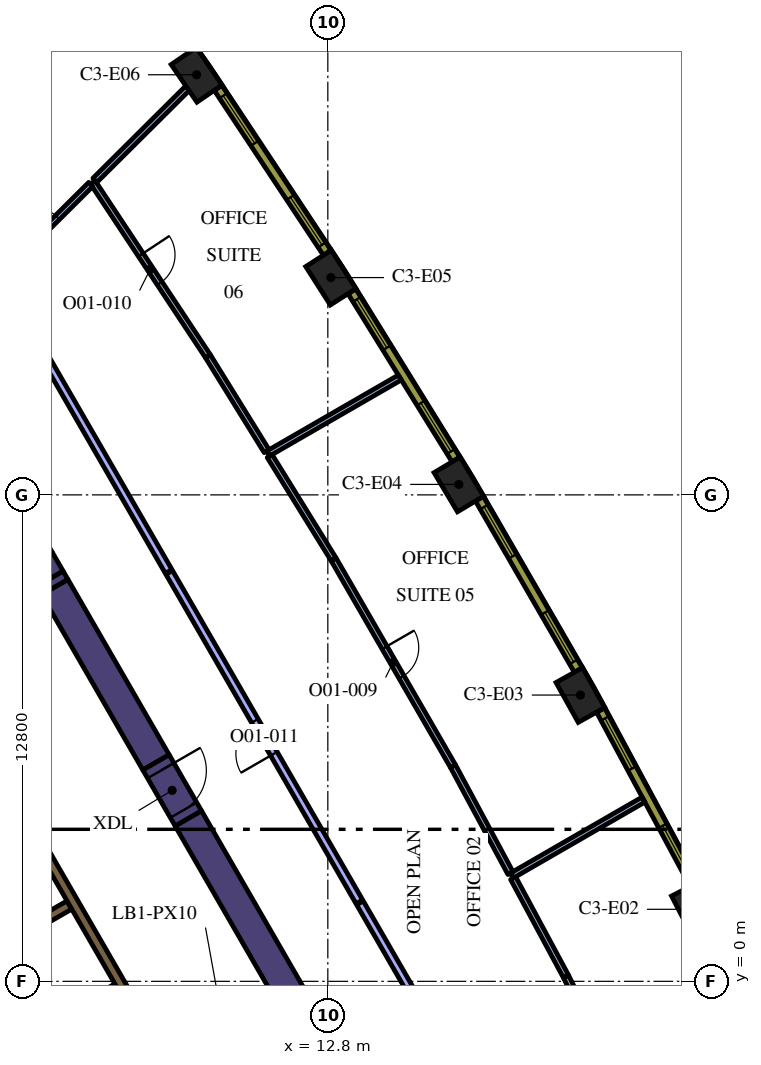
"""IFC4 building model, lengths in metres.
Left out: names, types, materials, properties, quantities, classifications, styles, units other than length and angle.
Written with IfcOpenShell. Run it as: python <this file> out.ifc"""

import sys

from ifc_helpers import new_model, si_unit, direction, frame, frame_2d, origin, origin_2d, place, context, subcontext, project, spatial, polyline, rectangle, outline, extrude, element, fill, save


model = new_model("IFC4")
c1 = context("Model", 3, precision=1e-05, world=origin(), true_north=direction((0.0, 1.0)))
c2 = subcontext(c1, "Body", "Model", "MODEL_VIEW")
j1 = project(units=[si_unit("LENGTHUNIT", "METRE"), si_unit("PLANEANGLEUNIT", "RADIAN")], contexts=[c1])
p1 = place(None, origin())
s1 = spatial("IfcSite", under=j1, at=p1, CompositionType="ELEMENT")
p2 = place(p1, origin())
s2 = spatial("IfcBuilding", under=s1, at=p2, CompositionType="ELEMENT")
p3 = place(p2, frame((0.0, 0.0, 141.6)))
s3 = spatial("IfcBuildingStorey", under=s2, at=p3, CompositionType="ELEMENT", Elevation=141.6)
for number, where, z_axis, x_axis in (
    (1, (22.476, 1.896, 0.0), (0.0, 0.0, 1.0), (-0.46, 0.888, 0.0)),
    (2, (19.447, 7.533, 0.0), (0.0, 0.0, 1.0), (-0.487, 0.874, 0.0)),
    (3, (16.247, 13.075, 0.0), (0.0, 0.0, 1.0), (-0.513, 0.858, 0.0)),
    (4, (12.88, 18.517, 0.0), (0.0, 0.0, 1.0), (-0.539, 0.842, 0.0)),
    (5, (9.348, 23.854, 0.0), (0.0, 0.0, 1.0), (-0.565, 0.825, 0.0)),
):
    element("IfcColumn", number, at=place(p3, frame(where, z_axis=z_axis, x_axis=x_axis)), inside=s3, PredefinedType="COLUMN", context=c2, shape_type="SweptSolid", body=[
        extrude(rectangle(XDim=1.2, YDim=0.8, at=origin_2d()), origin(), (0.0, 0.0, 1.0), 4.2),
    ])
p4 = place(p3, frame((9.129, 4.289, 0.0), z_axis=(0.0, 0.0, 1.0), x_axis=(0.499995742806, -0.866027861663, 0.0)))
e6 = element("IfcWall", 6, at=p4, inside=s3, PredefinedType="SOLIDWALL", context=c2, shape_type="SweptSolid", body=[
    extrude(rectangle(XDim=12.527, YDim=0.8, at=frame_2d((6.264, 0.0))), origin(), (0.0, 0.0, 1.0), 4.2),
])
p5 = place(p3, frame((5.489, 10.594, 0.0), z_axis=(0.0, 0.0, 1.0), x_axis=(-0.500000383388, 0.866025182435, 0.0)))
e7 = element("IfcWall", 7, at=p5, inside=s3, PredefinedType="SOLIDWALL", context=c2, shape_type="SweptSolid", body=[
    extrude(rectangle(XDim=0.558, YDim=0.8, at=frame_2d((0.279, 0.0))), origin(), (0.0, 0.0, 1.0), 4.2),
])
p6 = place(p3, frame((5.615, 10.375, 0.0), z_axis=(0.0, 0.0, 1.0), x_axis=(0.500002746266, -0.866023818221, 0.0)))
e8 = element("IfcWall", 8, at=p6, inside=s3, PredefinedType="SOLIDWALL", context=c2, shape_type="SweptSolid", body=[
    extrude(rectangle(XDim=5.328, YDim=0.8, at=frame_2d((2.664, 0.0))), origin(), (0.0, 0.0, 1.0), 4.2),
])
p7 = place(p3, origin())
e9 = element("IfcWall", 9, at=p7, inside=s3, PredefinedType="SOLIDWALL", context=c2, shape_type="SweptSolid", body=[
    extrude(outline(polyline([(5.432, 10.272), (5.308, 10.487), (5.836, 10.792), (5.96, 10.577), (5.432, 10.272)])), origin(), (0.0, 0.0, 1.0), 4.2),
])
p8 = place(p3, frame((5.209, 11.078, 0.0), z_axis=(0.0, 0.0, 1.0), x_axis=(-0.500035624827, 0.866004834804, 0.0)))
e10 = element("IfcWall", 10, at=p8, inside=s3, PredefinedType="SOLIDWALL", context=c2, shape_type="SweptSolid", body=[
    extrude(rectangle(XDim=6.388, YDim=0.8, at=frame_2d((3.194, 0.0))), origin(), (0.0, 0.0, 1.0), 4.2),
])
p9 = place(p3, frame((5.97, -2.591, 0.0), z_axis=(0.0, 0.0, 1.0), x_axis=(-0.499994469932, 0.866028596547, 0.0)))
e11 = element("IfcWall", 11, at=p9, inside=s3, PredefinedType="SOLIDWALL", context=c2, shape_type="SweptSolid", body=[
    extrude(rectangle(XDim=10.488, YDim=0.25, at=frame_2d((5.244, 0.0))), origin(), (0.0, 0.0, 1.0), 4.2),
])
for number, where, z_axis, x_axis in (
    (12, (4.094, 0.909, 0.0), (0.0, 0.0, 1.0), (0.866, 0.5, 0.0)),
    (13, (5.354, -1.274, 0.0), (0.0, 0.0, 1.0), (0.866, 0.5, 0.0)),
):
    element("IfcWall", number, at=place(p3, frame(where, z_axis=z_axis, x_axis=x_axis)), inside=s3, PredefinedType="SOLIDWALL", context=c2, shape_type="SweptSolid", body=[
        extrude(rectangle(XDim=2.2, YDim=0.25, at=frame_2d((1.1, 0.0))), origin(), (0.0, 0.0, 1.0), 4.2),
    ])
p10 = place(p3, frame((8.565, -2.185, 0.0), z_axis=(0.0, 0.0, 1.0), x_axis=(-0.499997954832, 0.866026584559, 0.0)))
e14 = element("IfcWall", 14, at=p10, inside=s3, PredefinedType="SOLIDWALL", context=c2, shape_type="SweptSolid", body=[
    extrude(rectangle(XDim=12.35, YDim=0.25, at=frame_2d((6.175, 0.0))), origin(), (0.0, 0.0, 1.0), 4.2),
])
p11 = place(p10, frame((0.585, 0.0, 0.0)))
e15 = element("IfcOpeningElement", 15, at=p11, cuts=e14, PredefinedType="OPENING", context=c2, shape_type="SweptSolid", body=[
    extrude(rectangle(XDim=1.1, YDim=2.1, at=frame_2d((0.55, 1.05))), frame((0.0, 0.135, 0.0), z_axis=(0.0, -1.0, 0.0), x_axis=(1.0, 0.0, 0.0)), (0.0, 0.0, 1.0), 0.27),
])
p12 = place(p3, frame((8.279, 5.761, 0.0), z_axis=(0.0, 0.0, 1.0), x_axis=(0.500062241894, -0.865989465428, 0.0)))
e16 = element("IfcWall", 16, at=p12, inside=s3, PredefinedType="SOLIDWALL", context=c2, shape_type="SweptSolid", body=[
    extrude(rectangle(XDim=1.7, YDim=0.8, at=frame_2d((0.85, 0.0))), origin(), (0.0, 0.0, 1.0), 4.2),
])
p13 = place(p12, frame((0.25, 0.0, 0.0)))
e17 = element("IfcOpeningElement", 17, at=p13, cuts=e16, PredefinedType="OPENING", context=c2, shape_type="SweptSolid", body=[
    extrude(rectangle(XDim=1.2, YDim=2.1, at=frame_2d((0.6, 1.05))), frame((0.0, 0.41, 0.0), z_axis=(0.0, -1.0, 0.0), x_axis=(1.0, 0.0, 0.0)), (0.0, 0.0, 1.0), 0.82),
])
p14 = place(p3, frame((17.641, 2.781, 0.0), z_axis=(0.0, 0.0, 1.0), x_axis=(0.866053520969, 0.499951296445, 0.0)))
e18 = element("IfcWall", 18, at=p14, inside=s3, PredefinedType="PARTITIONING", context=c2, shape_type="SweptSolid", body=[
    extrude(rectangle(XDim=4.002, YDim=0.15, at=frame_2d((2.001, 0.0))), origin(), (0.0, 0.0, 1.0), 3.15),
])
p15 = place(p3, frame((19.066, 0.129, 0.0), z_axis=(0.0, 0.0, 1.0), x_axis=(0.446202922071, -0.89493181435, 0.0)))
e19 = element("IfcWall", 19, at=p15, inside=s3, PredefinedType="PARTITIONING", context=c2, shape_type="SweptSolid", body=[
    extrude(rectangle(XDim=6.282, YDim=0.15, at=frame_2d((3.141, 0.0))), origin(), (0.0, 0.0, 1.0), 3.15),
])
p16 = place(p15, frame((2.683, 0.0, 0.0)))
e20 = element("IfcOpeningElement", 20, at=p16, cuts=e19, PredefinedType="OPENING", context=c2, shape_type="SweptSolid", body=[
    extrude(rectangle(XDim=0.9, YDim=2.1, at=frame_2d((0.45, 1.05))), frame((0.0, 0.085, 0.0), z_axis=(0.0, -1.0, 0.0), x_axis=(1.0, 0.0, 0.0)), (0.0, 0.0, 1.0), 0.17),
])
p17 = place(p3, frame((19.066, 0.129, 0.0), z_axis=(0.0, 0.0, 1.0), x_axis=(-0.473335829303, 0.880882053795, 0.0)))
e21 = element("IfcWall", 21, at=p17, inside=s3, PredefinedType="PARTITIONING", context=c2, shape_type="SweptSolid", body=[
    extrude(rectangle(XDim=2.935, YDim=0.15, at=frame_2d((1.468, 0.0))), origin(), (0.0, 0.0, 1.0), 3.15),
])
p18 = place(p3, frame((11.229, 13.887, 0.0), z_axis=(0.0, 0.0, 1.0), x_axis=(0.866038271014, 0.499977712642, 0.0)))
e22 = element("IfcWall", 22, at=p18, inside=s3, PredefinedType="PARTITIONING", context=c2, shape_type="SweptSolid", body=[
    extrude(rectangle(XDim=4.002, YDim=0.15, at=frame_2d((2.001, 0.0))), origin(), (0.0, 0.0, 1.0), 3.15),
])
p19 = place(p3, frame((17.606, 2.847, 0.0), z_axis=(0.0, 0.0, 1.0), x_axis=(-0.473348321673, 0.880875340993, 0.0)))
e23 = element("IfcWall", 23, at=p19, inside=s3, PredefinedType="PARTITIONING", context=c2, shape_type="SweptSolid", body=[
    extrude(rectangle(XDim=3.197, YDim=0.15, at=frame_2d((1.599, 0.0))), origin(), (0.0, 0.0, 1.0), 3.15),
])
p20 = place(p3, frame((12.951, 11.104, 0.0), z_axis=(0.0, 0.0, 1.0), x_axis=(0.499992691614, -0.866029623242, 0.0)))
e24 = element("IfcWall", 24, at=p20, inside=s3, PredefinedType="PARTITIONING", context=c2, shape_type="SweptSolid", body=[
    extrude(rectangle(XDim=6.282, YDim=0.15, at=frame_2d((3.141, 0.0))), origin(), (0.0, 0.0, 1.0), 3.15),
])
p21 = place(p20, frame((2.683, 0.0, 0.0)))
e25 = element("IfcOpeningElement", 25, at=p21, cuts=e24, PredefinedType="OPENING", context=c2, shape_type="SweptSolid", body=[
    extrude(rectangle(XDim=0.9, YDim=2.1, at=frame_2d((0.45, 1.05))), frame((0.0, 0.085, 0.0), z_axis=(0.0, -1.0, 0.0), x_axis=(1.0, 0.0, 0.0)), (0.0, 0.0, 1.0), 0.17),
])
p22 = place(p3, frame((12.951, 11.104, 0.0), z_axis=(0.0, 0.0, 1.0), x_axis=(-0.526204763311, 0.850357893518, 0.0)))
e26 = element("IfcWall", 26, at=p22, inside=s3, PredefinedType="PARTITIONING", context=c2, shape_type="SweptSolid", body=[
    extrude(rectangle(XDim=3.197, YDim=0.15, at=frame_2d((1.599, 0.0))), origin(), (0.0, 0.0, 1.0), 3.15),
])
p23 = place(p3, frame((11.19, 13.951, 0.0), z_axis=(0.0, 0.0, 1.0), x_axis=(-0.526165616903, 0.850382116221, 0.0)))
e27 = element("IfcWall", 27, at=p23, inside=s3, PredefinedType="PARTITIONING", context=c2, shape_type="SweptSolid", body=[
    extrude(rectangle(XDim=2.935, YDim=0.15, at=frame_2d((1.468, 0.0))), origin(), (0.0, 0.0, 1.0), 3.15),
])
p24 = place(p3, frame((6.616, 21.024, 0.0), z_axis=(0.0, 0.0, 1.0), x_axis=(0.551915124006, -0.833900291338, 0.0)))
e28 = element("IfcWall", 28, at=p24, inside=s3, PredefinedType="PARTITIONING", context=c2, shape_type="SweptSolid", body=[
    extrude(rectangle(XDim=5.488, YDim=0.15, at=frame_2d((2.744, 0.0))), origin(), (0.0, 0.0, 1.0), 3.15),
])
p25 = place(p24, frame((2.288, 0.0, 0.0)))
e29 = element("IfcOpeningElement", 29, at=p25, cuts=e28, PredefinedType="OPENING", context=c2, shape_type="SweptSolid", body=[
    extrude(rectangle(XDim=0.9, YDim=2.1, at=frame_2d((0.45, 1.05))), frame((0.0, 0.085, 0.0), z_axis=(0.0, -1.0, 0.0), x_axis=(1.0, 0.0, 0.0)), (0.0, 0.0, 1.0), 0.17),
])
p26 = place(p3, frame((6.67, 21.078, 0.0), z_axis=(0.0, 0.0, 1.0), x_axis=(0.709236178776, 0.704970951681, 0.0)))
e30 = element("IfcWall", 30, at=p26, inside=s3, PredefinedType="PARTITIONING", context=c2, shape_type="SweptSolid", body=[
    extrude(rectangle(XDim=3.434, YDim=0.15, at=frame_2d((1.717, 0.0))), origin(), (0.0, 0.0, 1.0), 3.15),
])
p27 = place(p3, frame((4.128, 18.55, 0.0), z_axis=(0.0, 0.0, 1.0), x_axis=(0.709237676072, 0.704969445324, 0.0)))
e31 = element("IfcWall", 31, at=p27, inside=s3, PredefinedType="PARTITIONING", context=c2, shape_type="SweptSolid", body=[
    extrude(rectangle(XDim=3.432, YDim=0.15, at=frame_2d((1.716, 0.0))), origin(), (0.0, 0.0, 1.0), 3.15),
])
p28 = place(p27, frame((1.3, 0.0, 0.0)))
e32 = element("IfcOpeningElement", 32, at=p28, cuts=e31, PredefinedType="OPENING", context=c2, shape_type="SweptSolid", body=[
    extrude(rectangle(XDim=0.9, YDim=2.1, at=frame_2d((0.45, 1.05))), frame((0.0, 0.085, 0.0), z_axis=(0.0, -1.0, 0.0), x_axis=(1.0, 0.0, 0.0)), (0.0, 0.0, 1.0), 0.17),
])
p29 = place(p3, frame((13.63, 2.091, 0.0), z_axis=(0.0, 0.0, 1.0), x_axis=(-0.499990634175, 0.866030811078, 0.0)))
e33 = element("IfcWall", 33, at=p29, inside=s3, PredefinedType="PARTITIONING", context=c2, shape_type="SweptSolid", body=[
    extrude(rectangle(XDim=10.008, YDim=0.2, at=frame_2d((5.004, 0.0))), origin(), (0.0, 0.0, 1.0), 3.15),
])
p30 = place(p29, frame((4.5, 0.0, 0.0)))
e34 = element("IfcOpeningElement", 34, at=p30, cuts=e33, PredefinedType="OPENING", context=c2, shape_type="SweptSolid", body=[
    extrude(rectangle(XDim=1.0, YDim=2.1, at=frame_2d((0.5, 1.05))), frame((0.0, 0.11, 0.0), z_axis=(0.0, -1.0, 0.0), x_axis=(1.0, 0.0, 0.0)), (0.0, 0.0, 1.0), 0.22),
])
p31 = place(p3, frame((8.611, 10.785, 0.0), z_axis=(0.0, 0.0, 1.0), x_axis=(-0.499987928593, 0.866032373102, 0.0)))
e35 = element("IfcWall", 35, at=p31, inside=s3, PredefinedType="PARTITIONING", context=c2, shape_type="SweptSolid", body=[
    extrude(rectangle(XDim=8.889, YDim=0.2, at=frame_2d((4.445, 0.0))), origin(), (0.0, 0.0, 1.0), 3.15),
])
p32 = place(p3, frame((18.504, -6.35, 0.0), z_axis=(0.0, 0.0, 1.0), x_axis=(-0.499995029582, 0.866028273438, 0.0)))
e36 = element("IfcWall", 36, at=p32, inside=s3, PredefinedType="PARTITIONING", context=c2, shape_type="SweptSolid", body=[
    extrude(rectangle(XDim=9.717, YDim=0.2, at=frame_2d((4.859, 0.0))), origin(), (0.0, 0.0, 1.0), 3.15),
])
p33 = place(p3, frame((22.44, 2.555, 0.0), z_axis=(0.0, 0.0, 1.0), x_axis=(-0.473349833294, 0.880874528704, 0.0)))
e37 = element("IfcWall", 37, at=p33, inside=s3, PredefinedType="SOLIDWALL", context=c2, shape_type="SweptSolid", body=[
    extrude(rectangle(XDim=5.204, YDim=0.24, at=frame_2d((2.602, 0.0))), origin(), (0.0, 0.0, 1.0), 3.95),
])
p34 = place(p33, frame((0.248, 0.0, 0.9)))
e38 = element("IfcOpeningElement", 38, at=p34, cuts=e37, PredefinedType="OPENING", context=c2, shape_type="SweptSolid", body=[
    extrude(rectangle(XDim=1.5, YDim=2.55, at=frame_2d((0.75, 1.275))), frame((0.0, 0.13, 0.0), z_axis=(0.0, -1.0, 0.0), x_axis=(1.0, 0.0, 0.0)), (0.0, 0.0, 1.0), 0.26),
])
p35 = place(p33, frame((3.455, 0.0, 0.9)))
e39 = element("IfcOpeningElement", 39, at=p35, cuts=e37, PredefinedType="OPENING", context=c2, shape_type="SweptSolid", body=[
    extrude(rectangle(XDim=1.5, YDim=2.55, at=frame_2d((0.75, 1.275))), frame((0.0, 0.13, 0.0), z_axis=(0.0, -1.0, 0.0), x_axis=(1.0, 0.0, 0.0)), (0.0, 0.0, 1.0), 0.26),
])
p36 = place(p3, frame((19.391, 8.191, 0.0), z_axis=(0.0, 0.0, 1.0), x_axis=(-0.500009456303, 0.866019944116, 0.0)))
e40 = element("IfcWall", 40, at=p36, inside=s3, PredefinedType="SOLIDWALL", context=c2, shape_type="SweptSolid", body=[
    extrude(rectangle(XDim=5.204, YDim=0.24, at=frame_2d((2.602, 0.0))), origin(), (0.0, 0.0, 1.0), 3.95),
])
p37 = place(p36, frame((0.248, 0.0, 0.9)))
e41 = element("IfcOpeningElement", 41, at=p37, cuts=e40, PredefinedType="OPENING", context=c2, shape_type="SweptSolid", body=[
    extrude(rectangle(XDim=1.5, YDim=2.55, at=frame_2d((0.75, 1.275))), frame((0.0, 0.13, 0.0), z_axis=(0.0, -1.0, 0.0), x_axis=(1.0, 0.0, 0.0)), (0.0, 0.0, 1.0), 0.26),
])
p38 = place(p36, frame((3.455, 0.0, 0.9)))
e42 = element("IfcOpeningElement", 42, at=p38, cuts=e40, PredefinedType="OPENING", context=c2, shape_type="SweptSolid", body=[
    extrude(rectangle(XDim=1.5, YDim=2.55, at=frame_2d((0.75, 1.275))), frame((0.0, 0.13, 0.0), z_axis=(0.0, -1.0, 0.0), x_axis=(1.0, 0.0, 0.0)), (0.0, 0.0, 1.0), 0.26),
])
p39 = place(p3, frame((16.171, 13.731, 0.0), z_axis=(0.0, 0.0, 1.0), x_axis=(-0.526197926587, 0.850362124072, 0.0)))
e43 = element("IfcWall", 43, at=p39, inside=s3, PredefinedType="SOLIDWALL", context=c2, shape_type="SweptSolid", body=[
    extrude(rectangle(XDim=5.203, YDim=0.24, at=frame_2d((2.602, 0.0))), origin(), (0.0, 0.0, 1.0), 3.95),
])
p40 = place(p39, frame((0.248, 0.0, 0.9)))
e44 = element("IfcOpeningElement", 44, at=p40, cuts=e43, PredefinedType="OPENING", context=c2, shape_type="SweptSolid", body=[
    extrude(rectangle(XDim=1.5, YDim=2.55, at=frame_2d((0.75, 1.275))), frame((0.0, 0.13, 0.0), z_axis=(0.0, -1.0, 0.0), x_axis=(1.0, 0.0, 0.0)), (0.0, 0.0, 1.0), 0.26),
])
p41 = place(p39, frame((3.455, 0.0, 0.9)))
e45 = element("IfcOpeningElement", 45, at=p41, cuts=e43, PredefinedType="OPENING", context=c2, shape_type="SweptSolid", body=[
    extrude(rectangle(XDim=1.5, YDim=2.55, at=frame_2d((0.75, 1.275))), frame((0.0, 0.13, 0.0), z_axis=(0.0, -1.0, 0.0), x_axis=(1.0, 0.0, 0.0)), (0.0, 0.0, 1.0), 0.26),
])
p42 = place(p3, frame((12.783, 19.171, 0.0), z_axis=(0.0, 0.0, 1.0), x_axis=(-0.551892811511, 0.833915058386, 0.0)))
e46 = element("IfcWall", 46, at=p42, inside=s3, PredefinedType="SOLIDWALL", context=c2, shape_type="SweptSolid", body=[
    extrude(rectangle(XDim=5.204, YDim=0.24, at=frame_2d((2.602, 0.0))), origin(), (0.0, 0.0, 1.0), 3.95),
])
p43 = place(p42, frame((0.248, 0.0, 0.9)))
e47 = element("IfcOpeningElement", 47, at=p43, cuts=e46, PredefinedType="OPENING", context=c2, shape_type="SweptSolid", body=[
    extrude(rectangle(XDim=1.5, YDim=2.55, at=frame_2d((0.75, 1.275))), frame((0.0, 0.13, 0.0), z_axis=(0.0, -1.0, 0.0), x_axis=(1.0, 0.0, 0.0)), (0.0, 0.0, 1.0), 0.26),
])
p44 = place(p42, frame((3.455, 0.0, 0.9)))
e48 = element("IfcOpeningElement", 48, at=p44, cuts=e46, PredefinedType="OPENING", context=c2, shape_type="SweptSolid", body=[
    extrude(rectangle(XDim=1.5, YDim=2.55, at=frame_2d((0.75, 1.275))), frame((0.0, 0.13, 0.0), z_axis=(0.0, -1.0, 0.0), x_axis=(1.0, 0.0, 0.0)), (0.0, 0.0, 1.0), 0.26),
])
p45 = place(p3, frame((9.231, 24.504, 0.0), z_axis=(0.0, 0.0, 1.0), x_axis=(-0.577115207679, 0.816662743772, 0.0)))
e49 = element("IfcWall", 49, at=p45, inside=s3, PredefinedType="SOLIDWALL", context=c2, shape_type="SweptSolid", body=[
    extrude(rectangle(XDim=5.213, YDim=0.24, at=frame_2d((2.606, 0.0))), origin(), (0.0, 0.0, 1.0), 3.95),
])
p46 = place(p45, frame((0.261, 0.0, 0.9)))
e50 = element("IfcOpeningElement", 50, at=p46, cuts=e49, PredefinedType="OPENING", context=c2, shape_type="SweptSolid", body=[
    extrude(rectangle(XDim=1.5, YDim=2.55, at=frame_2d((0.75, 1.275))), frame((0.0, 0.13, 0.0), z_axis=(0.0, -1.0, 0.0), x_axis=(1.0, 0.0, 0.0)), (0.0, 0.0, 1.0), 0.26),
])
p47 = place(p45, frame((3.492, 0.0, 0.9)))
e51 = element("IfcOpeningElement", 51, at=p47, cuts=e49, PredefinedType="OPENING", context=c2, shape_type="SweptSolid", body=[
    extrude(rectangle(XDim=1.5, YDim=2.55, at=frame_2d((0.75, 1.275))), frame((0.0, 0.13, 0.0), z_axis=(0.0, -1.0, 0.0), x_axis=(1.0, 0.0, 0.0)), (0.0, 0.0, 1.0), 0.26),
])
p48 = place(p13, origin())
e52 = element("IfcDoor", 52, at=p48, inside=s3, OperationType="SINGLE_SWING_LEFT", PredefinedType="DOOR", context=c2, shape_type="SweptSolid", body=[
    extrude(rectangle(XDim=1.2, YDim=2.1, at=frame_2d((0.6, 1.05))), frame((0.0, 0.025, 0.0), z_axis=(0.0, -1.0, 0.0), x_axis=(1.0, 0.0, 0.0)), (0.0, 0.0, 1.0), 0.05),
])
fill(e17, e52)
p49 = place(p21, origin())
e53 = element("IfcDoor", 53, at=p49, inside=s3, OperationType="SINGLE_SWING_LEFT", PredefinedType="DOOR", context=c2, shape_type="SweptSolid", body=[
    extrude(rectangle(XDim=0.9, YDim=2.1, at=frame_2d((0.45, 1.05))), frame((0.0, 0.025, 0.0), z_axis=(0.0, -1.0, 0.0), x_axis=(1.0, 0.0, 0.0)), (0.0, 0.0, 1.0), 0.05),
])
fill(e25, e53)
p50 = place(p25, origin())
e54 = element("IfcDoor", 54, at=p50, inside=s3, OperationType="SINGLE_SWING_LEFT", PredefinedType="DOOR", context=c2, shape_type="SweptSolid", body=[
    extrude(rectangle(XDim=0.9, YDim=2.1, at=frame_2d((0.45, 1.05))), frame((0.0, 0.025, 0.0), z_axis=(0.0, -1.0, 0.0), x_axis=(1.0, 0.0, 0.0)), (0.0, 0.0, 1.0), 0.05),
])
fill(e29, e54)
p51 = place(p30, origin())
e55 = element("IfcDoor", 55, at=p51, inside=s3, OperationType="SINGLE_SWING_LEFT", PredefinedType="DOOR", context=c2, shape_type="SweptSolid", body=[
    extrude(rectangle(XDim=1.0, YDim=2.1, at=frame_2d((0.5, 1.05))), frame((0.0, 0.025, 0.0), z_axis=(0.0, -1.0, 0.0), x_axis=(1.0, 0.0, 0.0)), (0.0, 0.0, 1.0), 0.05),
])
fill(e34, e55)
p52 = place(p28, origin())
e56 = element("IfcDoor", 56, at=p52, inside=s3, OperationType="SINGLE_SWING_RIGHT", PredefinedType="DOOR", context=c2, shape_type="SweptSolid", body=[
    extrude(rectangle(XDim=0.9, YDim=2.1, at=frame_2d((0.45, 1.05))), frame((0.0, 0.025, 0.0), z_axis=(0.0, -1.0, 0.0), x_axis=(1.0, 0.0, 0.0)), (0.0, 0.0, 1.0), 0.05),
])
fill(e32, e56)
p53 = place(p34, origin())
e57 = element("IfcWindow", 57, at=p53, inside=s3, PartitioningType="SINGLE_PANEL", PredefinedType="WINDOW", context=c2, shape_type="SweptSolid", body=[
    extrude(rectangle(XDim=1.5, YDim=2.55, at=frame_2d((0.75, 1.275))), frame((0.0, 0.04, 0.0), z_axis=(0.0, -1.0, 0.0), x_axis=(1.0, 0.0, 0.0)), (0.0, 0.0, 1.0), 0.06),
])
fill(e38, e57)
p54 = place(p35, origin())
e58 = element("IfcWindow", 58, at=p54, inside=s3, PartitioningType="SINGLE_PANEL", PredefinedType="WINDOW", context=c2, shape_type="SweptSolid", body=[
    extrude(rectangle(XDim=1.5, YDim=2.55, at=frame_2d((0.75, 1.275))), frame((0.0, 0.04, 0.0), z_axis=(0.0, -1.0, 0.0), x_axis=(1.0, 0.0, 0.0)), (0.0, 0.0, 1.0), 0.06),
])
fill(e39, e58)
p55 = place(p37, origin())
e59 = element("IfcWindow", 59, at=p55, inside=s3, PartitioningType="SINGLE_PANEL", PredefinedType="WINDOW", context=c2, shape_type="SweptSolid", body=[
    extrude(rectangle(XDim=1.5, YDim=2.55, at=frame_2d((0.75, 1.275))), frame((0.0, 0.04, 0.0), z_axis=(0.0, -1.0, 0.0), x_axis=(1.0, 0.0, 0.0)), (0.0, 0.0, 1.0), 0.06),
])
fill(e41, e59)
p56 = place(p38, origin())
e60 = element("IfcWindow", 60, at=p56, inside=s3, PartitioningType="SINGLE_PANEL", PredefinedType="WINDOW", context=c2, shape_type="SweptSolid", body=[
    extrude(rectangle(XDim=1.5, YDim=2.55, at=frame_2d((0.75, 1.275))), frame((0.0, 0.04, 0.0), z_axis=(0.0, -1.0, 0.0), x_axis=(1.0, 0.0, 0.0)), (0.0, 0.0, 1.0), 0.06),
])
fill(e42, e60)
p57 = place(p40, origin())
e61 = element("IfcWindow", 61, at=p57, inside=s3, PartitioningType="SINGLE_PANEL", PredefinedType="WINDOW", context=c2, shape_type="SweptSolid", body=[
    extrude(rectangle(XDim=1.5, YDim=2.55, at=frame_2d((0.75, 1.275))), frame((0.0, 0.04, 0.0), z_axis=(0.0, -1.0, 0.0), x_axis=(1.0, 0.0, 0.0)), (0.0, 0.0, 1.0), 0.06),
])
fill(e44, e61)
p58 = place(p41, origin())
e62 = element("IfcWindow", 62, at=p58, inside=s3, PartitioningType="SINGLE_PANEL", PredefinedType="WINDOW", context=c2, shape_type="SweptSolid", body=[
    extrude(rectangle(XDim=1.5, YDim=2.55, at=frame_2d((0.75, 1.275))), frame((0.0, 0.04, 0.0), z_axis=(0.0, -1.0, 0.0), x_axis=(1.0, 0.0, 0.0)), (0.0, 0.0, 1.0), 0.06),
])
fill(e45, e62)
p59 = place(p43, origin())
e63 = element("IfcWindow", 63, at=p59, inside=s3, PartitioningType="SINGLE_PANEL", PredefinedType="WINDOW", context=c2, shape_type="SweptSolid", body=[
    extrude(rectangle(XDim=1.5, YDim=2.55, at=frame_2d((0.75, 1.275))), frame((0.0, 0.04, 0.0), z_axis=(0.0, -1.0, 0.0), x_axis=(1.0, 0.0, 0.0)), (0.0, 0.0, 1.0), 0.06),
])
fill(e47, e63)
p60 = place(p44, origin())
e64 = element("IfcWindow", 64, at=p60, inside=s3, PartitioningType="SINGLE_PANEL", PredefinedType="WINDOW", context=c2, shape_type="SweptSolid", body=[
    extrude(rectangle(XDim=1.5, YDim=2.55, at=frame_2d((0.75, 1.275))), frame((0.0, 0.04, 0.0), z_axis=(0.0, -1.0, 0.0), x_axis=(1.0, 0.0, 0.0)), (0.0, 0.0, 1.0), 0.06),
])
fill(e48, e64)
save(model, sys.argv[1])
